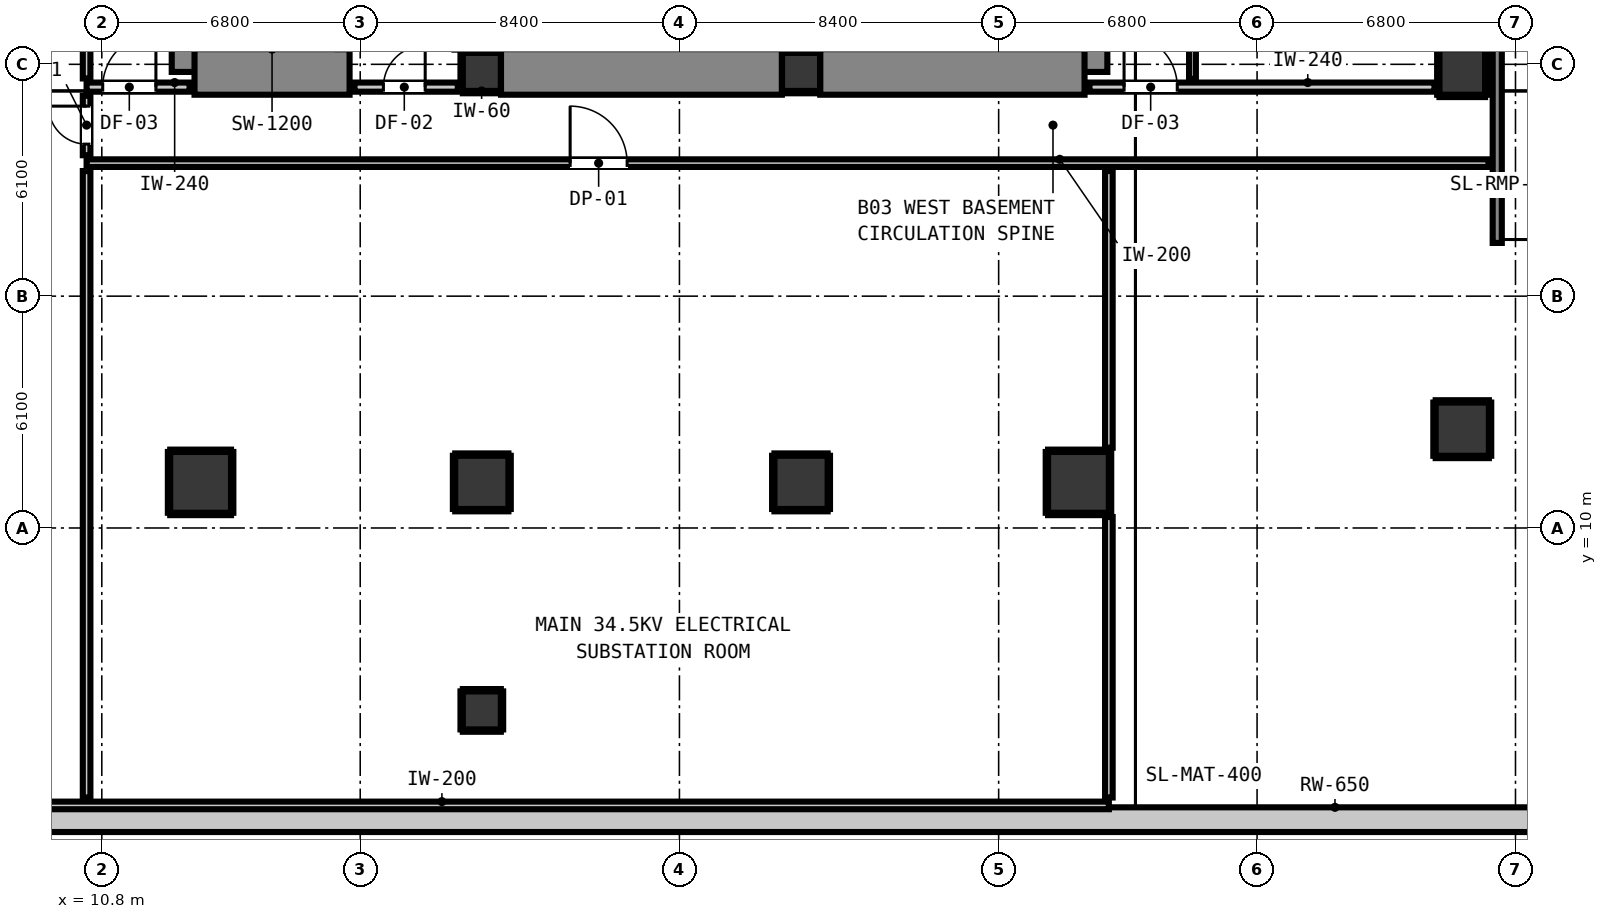
"""IFC4 building model, lengths in metres.
Left out: names, types, materials, properties, quantities, classifications, styles, units other than length and angle.
Written with IfcOpenShell. Run it as: python <this file> out.ifc"""

import sys

from ifc_helpers import new_model, si_unit, direction, frame, frame_2d, origin, origin_2d, place, context, subcontext, project, spatial, rectangle, circle, extrude, element, fill, save


model = new_model("IFC4")
c1 = context("Model", 3, precision=1e-05, world=origin(), true_north=direction((0.0, 1.0)))
c2 = subcontext(c1, "Body", "Model", "MODEL_VIEW")
j1 = project(units=[si_unit("LENGTHUNIT", "METRE"), si_unit("PLANEANGLEUNIT", "RADIAN")], contexts=[c1])
p1 = place(None, origin())
s1 = spatial("IfcSite", under=j1, at=p1, CompositionType="ELEMENT")
p2 = place(p1, origin())
s2 = spatial("IfcBuilding", under=s1, at=p2, CompositionType="ELEMENT")
p3 = place(p2, frame((0.0, 0.0, -13.2)))
s3 = spatial("IfcBuildingStorey", under=s2, at=p3, CompositionType="ELEMENT", Elevation=-13.2)
p4 = place(p3, frame((1.5, 2.325, 0.0), z_axis=(0.0, 0.0, 1.0), x_axis=(1.0, 0.0, 0.0)))
e1 = element("IfcWall", 1, at=p4, inside=s3, PredefinedType="SOLIDWALL", context=c2, shape_type="SweptSolid", body=[
    extrude(rectangle(XDim=83.5, YDim=0.65, at=frame_2d((41.75, 0.0))), origin(), (0.0, 0.0, 1.0), 4.4),
])
for number, where, z_axis, x_axis in (
    (2, (20.8, 22.0, -0.4), (0.0, 0.0, 1.0), (1.0, 0.0, 0.0)),
    (3, (29.2, 22.0, -0.4), (0.0, 0.0, 1.0), (1.0, 0.0, 0.0)),
):
    element("IfcColumn", number, at=place(p3, frame(where, z_axis=z_axis, x_axis=x_axis)), inside=s3, PredefinedType="COLUMN", context=c2, shape_type="SweptSolid", body=[
        extrude(rectangle(XDim=1.0, YDim=1.0, at=origin_2d()), origin(), (0.0, 0.0, 1.0), 4.8),
    ])
p5 = place(p3, frame((13.24, 22.0, 0.0), z_axis=(0.0, 0.0, 1.0), x_axis=(0.0, 1.0, 0.0)))
e4 = element("IfcWall", 4, at=p5, inside=s3, PredefinedType="SHEAR", context=c2, shape_type="SweptSolid", body=[
    extrude(rectangle(XDim=8.195, YDim=1.2, at=frame_2d((4.098, 0.0))), origin(), (0.0, 0.0, 1.0), 4.4),
])
p6 = place(p3, frame((13.24, 22.0, 0.0), z_axis=(0.0, 0.0, 1.0), x_axis=(1.0, 0.0, 0.0)))
e5 = element("IfcWall", 5, at=p6, inside=s3, PredefinedType="SHEAR", context=c2, shape_type="SweptSolid", body=[
    extrude(rectangle(XDim=4.08, YDim=1.2, at=frame_2d((2.04, 0.0))), origin(), (0.0, 0.0, 1.0), 4.4),
])
p7 = place(p3, frame((36.66, 22.0, 0.0), z_axis=(0.0, 0.0, 1.0), x_axis=(0.0, 1.0, 0.0)))
e6 = element("IfcWall", 6, at=p7, inside=s3, PredefinedType="SHEAR", context=c2, shape_type="SweptSolid", body=[
    extrude(rectangle(XDim=8.195, YDim=1.2, at=frame_2d((4.098, 0.0))), origin(), (0.0, 0.0, 1.0), 4.4),
])
p8 = place(p3, frame((29.705, 22.0, 0.0), z_axis=(0.0, 0.0, 1.0), x_axis=(1.0, 0.0, 0.0)))
e7 = element("IfcWall", 7, at=p8, inside=s3, PredefinedType="SHEAR", context=c2, shape_type="SweptSolid", body=[
    extrude(rectangle(XDim=6.955, YDim=1.2, at=frame_2d((3.478, 0.0))), origin(), (0.0, 0.0, 1.0), 4.4),
])
p9 = place(p3, frame((21.305, 22.0, 0.0), z_axis=(0.0, 0.0, 1.0), x_axis=(1.0, 0.0, 0.0)))
e8 = element("IfcWall", 8, at=p9, inside=s3, PredefinedType="SHEAR", context=c2, shape_type="SweptSolid", body=[
    extrude(rectangle(XDim=7.39, YDim=1.2, at=frame_2d((3.695, 0.0))), origin(), (0.0, 0.0, 1.0), 4.4),
])
p10 = place(p3, frame((47.52, 17.5, 0.0), z_axis=(0.0, 0.0, 1.0), x_axis=(0.0, 1.0, 0.0)))
e9 = element("IfcWall", 9, at=p10, inside=s3, PredefinedType="SHEAR", context=c2, shape_type="SweptSolid", body=[
    extrude(rectangle(XDim=19.2, YDim=0.24, at=frame_2d((9.6, 0.0))), origin(), (0.0, 0.0, 1.0), 4.4),
])
for number, where, z_axis, x_axis in (
    (10, (13.4, 11.2, -0.4), (0.0, 0.0, 1.0), (1.0, 0.0, 0.0)),
    (11, (36.5, 11.2, -0.4), (0.0, 0.0, 1.0), (1.0, 0.0, 0.0)),
):
    element("IfcColumn", number, at=place(p3, frame(where, z_axis=z_axis, x_axis=x_axis)), inside=s3, PredefinedType="COLUMN", context=c2, shape_type="SweptSolid", body=[
        extrude(rectangle(XDim=1.6, YDim=1.6, at=origin_2d()), origin(), (0.0, 0.0, 1.0), 4.8),
    ])
p11 = place(p3, frame((46.6, 22.0, -0.4), z_axis=(0.0, 0.0, 1.0), x_axis=(1.0, 0.0, 0.0)))
e12 = element("IfcColumn", 12, at=p11, inside=s3, PredefinedType="COLUMN", context=c2, shape_type="SweptSolid", body=[
    extrude(circle(Radius=0.6, at=origin_2d()), origin(), (0.0, 0.0, 1.0), 4.8),
])
for number, where, z_axis, x_axis in (
    (13, (46.6, 12.6, -0.4), (0.0, 0.0, 1.0), (1.0, 0.0, 0.0)),
    (14, (20.8, 11.2, -0.4), (0.0, 0.0, 1.0), (1.0, 0.0, 0.0)),
    (15, (29.2, 11.2, -0.4), (0.0, 0.0, 1.0), (1.0, 0.0, 0.0)),
):
    element("IfcColumn", number, at=place(p3, frame(where, z_axis=z_axis, x_axis=x_axis)), inside=s3, PredefinedType="COLUMN", context=c2, shape_type="SweptSolid", body=[
        extrude(rectangle(XDim=1.4, YDim=1.4, at=origin_2d()), origin(), (0.0, 0.0, 1.0), 4.8),
    ])
p12 = place(p3, frame((20.8, 5.2, -0.4), z_axis=(0.0, 0.0, 1.0), x_axis=(1.0, 0.0, 0.0)))
e16 = element("IfcColumn", 16, at=p12, inside=s3, PredefinedType="COLUMN", context=c2, shape_type="SweptSolid", body=[
    extrude(rectangle(XDim=1.0, YDim=1.0, at=origin_2d()), origin(), (0.0, 0.0, 1.0), 4.8),
])
p13 = place(p3, frame((10.4, 21.6, 0.0), z_axis=(0.0, 0.0, 1.0), x_axis=(1.0, 0.0, 0.0)))
e17 = element("IfcWall", 17, at=p13, inside=s3, PredefinedType="PARTITIONING", context=c2, shape_type="SweptSolid", body=[
    extrude(rectangle(XDim=2.71, YDim=0.24, at=frame_2d((1.355, 0.0))), origin(), (0.0, 0.0, 1.0), 3.335),
])
p14 = place(p13, frame((0.424, 0.0, 0.0)))
e18 = element("IfcOpeningElement", 18, at=p14, cuts=e17, PredefinedType="OPENING", context=c2, shape_type="SweptSolid", body=[
    extrude(rectangle(XDim=1.4, YDim=2.15, at=frame_2d((0.7, 1.075))), frame((0.0, 0.13, 0.0), z_axis=(0.0, -1.0, 0.0), x_axis=(1.0, 0.0, 0.0)), (0.0, 0.0, 1.0), 0.26),
])
p15 = place(p3, frame((17.45, 21.6, 0.0), z_axis=(0.0, 0.0, 1.0), x_axis=(1.0, 0.0, 0.0)))
e19 = element("IfcWall", 19, at=p15, inside=s3, PredefinedType="PARTITIONING", context=c2, shape_type="SweptSolid", body=[
    extrude(rectangle(XDim=2.718, YDim=0.24, at=frame_2d((1.359, 0.0))), origin(), (0.0, 0.0, 1.0), 3.335),
])
p16 = place(p15, frame((0.76, 0.0, 0.0)))
e20 = element("IfcOpeningElement", 20, at=p16, cuts=e19, PredefinedType="OPENING", context=c2, shape_type="SweptSolid", body=[
    extrude(rectangle(XDim=1.1, YDim=2.15, at=frame_2d((0.55, 1.075))), frame((0.0, 0.13, 0.0), z_axis=(0.0, -1.0, 0.0), x_axis=(1.0, 0.0, 0.0)), (0.0, 0.0, 1.0), 0.26),
])
p17 = place(p3, frame((36.79, 21.6, 0.0), z_axis=(0.0, 0.0, 1.0), x_axis=(1.0, 0.0, 0.0)))
e21 = element("IfcWall", 21, at=p17, inside=s3, PredefinedType="PARTITIONING", context=c2, shape_type="SweptSolid", body=[
    extrude(rectangle(XDim=9.078, YDim=0.24, at=frame_2d((4.539, 0.0))), origin(), (0.0, 0.0, 1.0), 3.335),
])
p18 = place(p17, frame((0.91, 0.0, 0.0)))
e22 = element("IfcOpeningElement", 22, at=p18, cuts=e21, PredefinedType="OPENING", context=c2, shape_type="SweptSolid", body=[
    extrude(rectangle(XDim=1.4, YDim=2.15, at=frame_2d((0.7, 1.075))), frame((0.0, 0.13, 0.0), z_axis=(0.0, -1.0, 0.0), x_axis=(1.0, 0.0, 0.0)), (0.0, 0.0, 1.0), 0.26),
])
p19 = place(p3, frame((2.2, 2.7, 0.0), z_axis=(0.0, 0.0, 1.0), x_axis=(1.0, 0.0, 0.0)))
e23 = element("IfcWall", 23, at=p19, inside=s3, PredefinedType="PARTITIONING", context=c2, shape_type="SweptSolid", body=[
    extrude(rectangle(XDim=35.1, YDim=0.2, at=frame_2d((17.55, 0.0))), origin(), (0.0, 0.0, 1.0), 4.1),
])
p20 = place(p3, frame((10.4, 19.6, 0.0), z_axis=(0.0, 0.0, 1.0), x_axis=(1.0, 0.0, 0.0)))
e24 = element("IfcWall", 24, at=p20, inside=s3, PredefinedType="PARTITIONING", context=c2, shape_type="SweptSolid", body=[
    extrude(rectangle(XDim=36.892, YDim=0.2, at=frame_2d((18.446, 0.0))), origin(), (0.0, 0.0, 1.0), 4.1),
])
p21 = place(p20, frame((12.724, 0.0, 0.0)))
e25 = element("IfcOpeningElement", 25, at=p21, cuts=e24, PredefinedType="OPENING", context=c2, shape_type="SweptSolid", body=[
    extrude(rectangle(XDim=1.5, YDim=2.15, at=frame_2d((0.75, 1.075))), frame((0.0, 0.11, 0.0), z_axis=(0.0, -1.0, 0.0), x_axis=(1.0, 0.0, 0.0)), (0.0, 0.0, 1.0), 0.22),
])
p22 = place(p3, frame((10.4, 2.908, 0.0), z_axis=(0.0, 0.0, 1.0), x_axis=(0.0, 1.0, 0.0)))
e26 = element("IfcWall", 26, at=p22, inside=s3, PredefinedType="PARTITIONING", context=c2, shape_type="SweptSolid", body=[
    extrude(rectangle(XDim=16.484, YDim=0.2, at=frame_2d((8.242, 0.0))), origin(), (0.0, 0.0, 1.0), 4.1),
])
p23 = place(p3, frame((10.4, 19.808, 0.0), z_axis=(0.0, 0.0, 1.0), x_axis=(0.0, 1.0, 0.0)))
e27 = element("IfcWall", 27, at=p23, inside=s3, PredefinedType="PARTITIONING", context=c2, shape_type="SweptSolid", body=[
    extrude(rectangle(XDim=1.564, YDim=0.2, at=frame_2d((0.782, 0.0))), origin(), (0.0, 0.0, 1.0), 4.1),
])
p24 = place(p23, frame((0.292, 0.0, 0.0)))
e28 = element("IfcOpeningElement", 28, at=p24, cuts=e27, PredefinedType="OPENING", context=c2, shape_type="SweptSolid", body=[
    extrude(rectangle(XDim=1.0, YDim=2.15, at=frame_2d((0.5, 1.075))), frame((0.0, 0.11, 0.0), z_axis=(0.0, -1.0, 0.0), x_axis=(1.0, 0.0, 0.0)), (0.0, 0.0, 1.0), 0.22),
])
p25 = place(p3, frame((10.4, 21.828, 0.0), z_axis=(0.0, 0.0, 1.0), x_axis=(0.0, 1.0, 0.0)))
e29 = element("IfcWall", 29, at=p25, inside=s3, PredefinedType="PARTITIONING", context=c2, shape_type="SweptSolid", body=[
    extrude(rectangle(XDim=17.764, YDim=0.2, at=frame_2d((8.882, 0.0))), origin(), (0.0, 0.0, 1.0), 4.1),
])
p26 = place(p3, frame((37.3, 2.908, 0.0), z_axis=(0.0, 0.0, 1.0), x_axis=(0.0, 1.0, 0.0)))
e30 = element("IfcWall", 30, at=p26, inside=s3, PredefinedType="PARTITIONING", context=c2, shape_type="SweptSolid", body=[
    extrude(rectangle(XDim=7.38, YDim=0.2, at=frame_2d((3.69, 0.0))), origin(), (0.0, 0.0, 1.0), 4.1),
])
p27 = place(p3, frame((37.3, 12.112, 0.0), z_axis=(0.0, 0.0, 1.0), x_axis=(0.0, 1.0, 0.0)))
e31 = element("IfcWall", 31, at=p27, inside=s3, PredefinedType="PARTITIONING", context=c2, shape_type="SweptSolid", body=[
    extrude(rectangle(XDim=7.28, YDim=0.2, at=frame_2d((3.64, 0.0))), origin(), (0.0, 0.0, 1.0), 4.1),
])
p28 = place(p3, frame((39.5, 21.818, 0.0), z_axis=(0.0, 0.0, 1.0), x_axis=(0.0, 1.0, 0.0)))
e32 = element("IfcWall", 32, at=p28, inside=s3, PredefinedType="PARTITIONING", context=c2, shape_type="SweptSolid", body=[
    extrude(rectangle(XDim=17.784, YDim=0.18, at=frame_2d((8.892, 0.0))), origin(), (0.0, 0.0, 1.0), 4.1),
])
for number, where, z_axis, x_axis in (
    (33, (20.3, 21.468, 0.0), (0.0, 0.0, 1.0), (1.0, 0.0, 0.0)),
    (34, (20.3, 22.532, 0.0), (0.0, 0.0, 1.0), (1.0, 0.0, 0.0)),
):
    element("IfcWall", number, at=place(p3, frame(where, z_axis=z_axis, x_axis=x_axis)), inside=s3, PredefinedType="PARTITIONING", context=c2, shape_type="SweptSolid", body=[
        extrude(rectangle(XDim=0.99, YDim=0.06, at=frame_2d((0.495, 0.0))), origin(), (0.0, 0.0, 1.0), 1.45),
    ])
p29 = place(p3, frame((20.268, 21.5, 0.0), z_axis=(0.0, 0.0, 1.0), x_axis=(0.0, 1.0, 0.0)))
e35 = element("IfcWall", 35, at=p29, inside=s3, PredefinedType="PARTITIONING", context=c2, shape_type="SweptSolid", body=[
    extrude(rectangle(XDim=1.0, YDim=0.06, at=frame_2d((0.5, 0.0))), origin(), (0.0, 0.0, 1.0), 1.45),
])
for number, where, z_axis, x_axis in (
    (36, (28.71, 21.468, 0.0), (0.0, 0.0, 1.0), (1.0, 0.0, 0.0)),
    (37, (28.71, 22.532, 0.0), (0.0, 0.0, 1.0), (1.0, 0.0, 0.0)),
):
    element("IfcWall", number, at=place(p3, frame(where, z_axis=z_axis, x_axis=x_axis)), inside=s3, PredefinedType="PARTITIONING", context=c2, shape_type="SweptSolid", body=[
        extrude(rectangle(XDim=0.98, YDim=0.06, at=frame_2d((0.49, 0.0))), origin(), (0.0, 0.0, 1.0), 1.45),
    ])
for number, where, z_axis, x_axis in (
    (38, (12.6, 10.368, 0.0), (0.0, 0.0, 1.0), (1.0, 0.0, 0.0)),
    (39, (12.6, 12.032, 0.0), (0.0, 0.0, 1.0), (1.0, 0.0, 0.0)),
):
    element("IfcWall", number, at=place(p3, frame(where, z_axis=z_axis, x_axis=x_axis)), inside=s3, PredefinedType="PARTITIONING", context=c2, shape_type="SweptSolid", body=[
        extrude(rectangle(XDim=1.6, YDim=0.06, at=frame_2d((0.8, 0.0))), origin(), (0.0, 0.0, 1.0), 1.45),
    ])
for number, where, z_axis, x_axis in (
    (40, (12.568, 10.4, 0.0), (0.0, 0.0, 1.0), (0.0, 1.0, 0.0)),
    (41, (14.232, 10.4, 0.0), (0.0, 0.0, 1.0), (0.0, 1.0, 0.0)),
    (42, (35.7, 10.368, 0.0), (0.0, 0.0, 1.0), (1.0, 0.0, 0.0)),
    (43, (35.7, 12.032, 0.0), (0.0, 0.0, 1.0), (1.0, 0.0, 0.0)),
    (44, (35.668, 10.4, 0.0), (0.0, 0.0, 1.0), (0.0, 1.0, 0.0)),
    (45, (37.332, 10.4, 0.0), (0.0, 0.0, 1.0), (0.0, 1.0, 0.0)),
):
    element("IfcWall", number, at=place(p3, frame(where, z_axis=z_axis, x_axis=x_axis)), inside=s3, PredefinedType="PARTITIONING", context=c2, shape_type="SweptSolid", body=[
        extrude(rectangle(XDim=1.6, YDim=0.06, at=frame_2d((0.8, 0.0))), origin(), (0.0, 0.0, 1.0), 1.45),
    ])
p30 = place(p3, frame((46.0, 21.368, 0.0), z_axis=(0.0, 0.0, 1.0), x_axis=(1.0, 0.0, 0.0)))
e46 = element("IfcWall", 46, at=p30, inside=s3, PredefinedType="PARTITIONING", context=c2, shape_type="SweptSolid", body=[
    extrude(rectangle(XDim=1.2, YDim=0.06, at=frame_2d((0.6, 0.0))), origin(), (0.0, 0.0, 1.0), 1.45),
])
for number, where, z_axis, x_axis in (
    (47, (45.968, 21.4, 0.0), (0.0, 0.0, 1.0), (0.0, 1.0, 0.0)),
    (48, (47.232, 21.4, 0.0), (0.0, 0.0, 1.0), (0.0, 1.0, 0.0)),
):
    element("IfcWall", number, at=place(p3, frame(where, z_axis=z_axis, x_axis=x_axis)), inside=s3, PredefinedType="PARTITIONING", context=c2, shape_type="SweptSolid", body=[
        extrude(rectangle(XDim=1.2, YDim=0.06, at=frame_2d((0.6, 0.0))), origin(), (0.0, 0.0, 1.0), 1.45),
    ])
for number, where, z_axis, x_axis in (
    (49, (45.9, 11.868, 0.0), (0.0, 0.0, 1.0), (1.0, 0.0, 0.0)),
    (50, (45.9, 13.332, 0.0), (0.0, 0.0, 1.0), (1.0, 0.0, 0.0)),
    (51, (45.868, 11.9, 0.0), (0.0, 0.0, 1.0), (0.0, 1.0, 0.0)),
    (52, (47.332, 11.9, 0.0), (0.0, 0.0, 1.0), (0.0, 1.0, 0.0)),
):
    element("IfcWall", number, at=place(p3, frame(where, z_axis=z_axis, x_axis=x_axis)), inside=s3, PredefinedType="PARTITIONING", context=c2, shape_type="SweptSolid", body=[
        extrude(rectangle(XDim=1.4, YDim=0.06, at=frame_2d((0.7, 0.0))), origin(), (0.0, 0.0, 1.0), 1.45),
    ])
for number, where, z_axis, x_axis in (
    (53, (20.1, 10.468, 0.0), (0.0, 0.0, 1.0), (1.0, 0.0, 0.0)),
    (54, (20.1, 11.932, 0.0), (0.0, 0.0, 1.0), (1.0, 0.0, 0.0)),
    (55, (20.068, 10.5, 0.0), (0.0, 0.0, 1.0), (0.0, 1.0, 0.0)),
    (56, (21.532, 10.5, 0.0), (0.0, 0.0, 1.0), (0.0, 1.0, 0.0)),
    (57, (28.5, 10.468, 0.0), (0.0, 0.0, 1.0), (1.0, 0.0, 0.0)),
    (58, (28.5, 11.932, 0.0), (0.0, 0.0, 1.0), (1.0, 0.0, 0.0)),
    (59, (28.468, 10.5, 0.0), (0.0, 0.0, 1.0), (0.0, 1.0, 0.0)),
    (60, (29.932, 10.5, 0.0), (0.0, 0.0, 1.0), (0.0, 1.0, 0.0)),
):
    element("IfcWall", number, at=place(p3, frame(where, z_axis=z_axis, x_axis=x_axis)), inside=s3, PredefinedType="PARTITIONING", context=c2, shape_type="SweptSolid", body=[
        extrude(rectangle(XDim=1.4, YDim=0.06, at=frame_2d((0.7, 0.0))), origin(), (0.0, 0.0, 1.0), 1.45),
    ])
for number, where, z_axis, x_axis in (
    (61, (20.3, 4.668, 0.0), (0.0, 0.0, 1.0), (1.0, 0.0, 0.0)),
    (62, (20.3, 5.732, 0.0), (0.0, 0.0, 1.0), (1.0, 0.0, 0.0)),
    (63, (20.268, 4.7, 0.0), (0.0, 0.0, 1.0), (0.0, 1.0, 0.0)),
    (64, (21.332, 4.7, 0.0), (0.0, 0.0, 1.0), (0.0, 1.0, 0.0)),
):
    element("IfcWall", number, at=place(p3, frame(where, z_axis=z_axis, x_axis=x_axis)), inside=s3, PredefinedType="PARTITIONING", context=c2, shape_type="SweptSolid", body=[
        extrude(rectangle(XDim=1.0, YDim=0.06, at=frame_2d((0.5, 0.0))), origin(), (0.0, 0.0, 1.0), 1.45),
    ])
p31 = place(p16, origin())
e65 = element("IfcDoor", 65, at=p31, inside=s3, OperationType="SINGLE_SWING_RIGHT", PredefinedType="DOOR", context=c2, shape_type="SweptSolid", body=[
    extrude(rectangle(XDim=1.1, YDim=2.15, at=frame_2d((0.55, 1.075))), frame((0.0, 0.025, 0.0), z_axis=(0.0, -1.0, 0.0), x_axis=(1.0, 0.0, 0.0)), (0.0, 0.0, 1.0), 0.05),
])
fill(e20, e65)
p32 = place(p14, origin())
e66 = element("IfcDoor", 66, at=p32, inside=s3, OperationType="SINGLE_SWING_RIGHT", PredefinedType="DOOR", context=c2, shape_type="SweptSolid", body=[
    extrude(rectangle(XDim=1.4, YDim=2.15, at=frame_2d((0.7, 1.075))), frame((0.0, 0.025, 0.0), z_axis=(0.0, -1.0, 0.0), x_axis=(1.0, 0.0, 0.0)), (0.0, 0.0, 1.0), 0.05),
])
fill(e18, e66)
p33 = place(p18, origin())
e67 = element("IfcDoor", 67, at=p33, inside=s3, OperationType="SINGLE_SWING_LEFT", PredefinedType="DOOR", context=c2, shape_type="SweptSolid", body=[
    extrude(rectangle(XDim=1.4, YDim=2.15, at=frame_2d((0.7, 1.075))), frame((0.0, 0.025, 0.0), z_axis=(0.0, -1.0, 0.0), x_axis=(1.0, 0.0, 0.0)), (0.0, 0.0, 1.0), 0.05),
])
fill(e22, e67)
p34 = place(p24, origin())
e68 = element("IfcDoor", 68, at=p34, inside=s3, OperationType="SINGLE_SWING_RIGHT", PredefinedType="DOOR", context=c2, shape_type="SweptSolid", body=[
    extrude(rectangle(XDim=1.0, YDim=2.15, at=frame_2d((0.5, 1.075))), frame((0.0, 0.025, 0.0), z_axis=(0.0, -1.0, 0.0), x_axis=(1.0, 0.0, 0.0)), (0.0, 0.0, 1.0), 0.05),
])
fill(e28, e68)
p35 = place(p21, origin())
e69 = element("IfcDoor", 69, at=p35, inside=s3, OperationType="SINGLE_SWING_LEFT", PredefinedType="DOOR", context=c2, shape_type="SweptSolid", body=[
    extrude(rectangle(XDim=1.5, YDim=2.15, at=frame_2d((0.75, 1.075))), frame((0.0, 0.025, 0.0), z_axis=(0.0, -1.0, 0.0), x_axis=(1.0, 0.0, 0.0)), (0.0, 0.0, 1.0), 0.05),
])
fill(e25, e69)
save(model, sys.argv[1])
